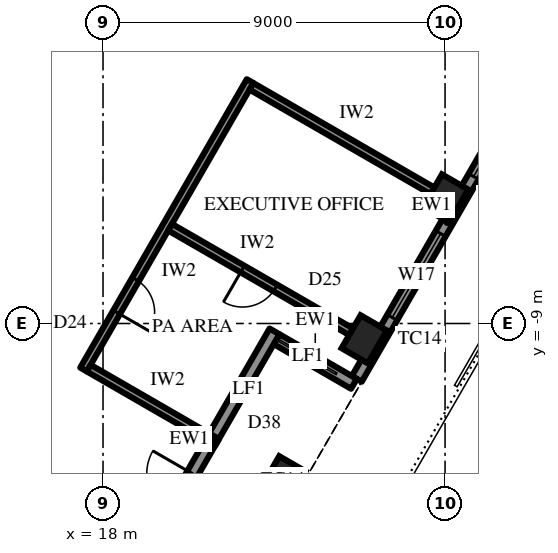
"""IFC4 building model, lengths in metres.
Left out: names, types, materials, properties, quantities, classifications, styles, units other than length and angle.
Written with IfcOpenShell. Run it as: python <this file> out.ifc"""

import sys

from ifc_helpers import new_model, si_unit, direction, frame, frame_2d, origin, origin_2d, place, context, subcontext, project, spatial, rectangle, extrude, element, fill, save


model = new_model("IFC4")
c1 = context("Model", 3, precision=1e-05, world=origin(), true_north=direction((0.0, 1.0)))
c2 = subcontext(c1, "Body", "Model", "MODEL_VIEW")
j1 = project(units=[si_unit("LENGTHUNIT", "METRE"), si_unit("PLANEANGLEUNIT", "RADIAN")], contexts=[c1])
p1 = place(None, origin())
s1 = spatial("IfcSite", under=j1, at=p1, CompositionType="ELEMENT")
p2 = place(p1, origin())
s2 = spatial("IfcBuilding", under=s1, at=p2, CompositionType="ELEMENT")
p3 = place(p2, frame((0.0, 0.0, 336.7)))
s3 = spatial("IfcBuildingStorey", under=s2, at=p3, CompositionType="ELEMENT", Elevation=336.7)
for number, where, z_axis, x_axis in (
    (1, (22.733, -13.125, 0.0), (0.0, 0.0, 1.0), (0.5, 0.866, 0.0)),
    (2, (24.874, -9.417, 0.0), (0.0, 0.0, 1.0), (0.5, 0.866, 0.0)),
    (3, (27.015, -5.708, 0.0), (0.0, 0.0, 1.0), (0.5, 0.866, 0.0)),
):
    element("IfcColumn", number, at=place(p3, frame(where, z_axis=z_axis, x_axis=x_axis)), inside=s3, PredefinedType="COLUMN", context=c2, shape_type="SweptSolid", body=[
        extrude(rectangle(XDim=1.0, YDim=0.8, at=origin_2d()), origin(), (0.0, 0.0, 1.0), 4.2),
    ])
p4 = place(p3, frame((24.677, -10.458, 0.0), z_axis=(0.0, 0.0, 1.0), x_axis=(0.499996453679, 0.866027451244, 0.0)))
e4 = element("IfcWall", 4, at=p4, inside=s3, PredefinedType="SOLIDWALL", context=c2, shape_type="SweptSolid", body=[
    extrude(rectangle(XDim=9.564, YDim=0.3, at=frame_2d((4.782, 0.0))), origin(), (0.0, 0.0, 1.0), 2.9),
])
p5 = place(p4, frame((1.866, 0.0, 0.6)))
e5 = element("IfcOpeningElement", 5, at=p5, cuts=e4, PredefinedType="OPENING", context=c2, shape_type="SweptSolid", body=[
    extrude(rectangle(XDim=2.55, YDim=2.05, at=frame_2d((1.275, 1.025))), frame((0.0, 0.16, 0.0), z_axis=(0.0, -1.0, 0.0), x_axis=(1.0, 0.0, 0.0)), (0.0, 0.0, 1.0), 0.32),
])
p6 = place(p4, frame((6.148, 0.0, 0.6)))
e6 = element("IfcOpeningElement", 6, at=p6, cuts=e4, PredefinedType="OPENING", context=c2, shape_type="SweptSolid", body=[
    extrude(rectangle(XDim=2.55, YDim=2.05, at=frame_2d((1.275, 1.025))), frame((0.0, 0.16, 0.0), z_axis=(0.0, -1.0, 0.0), x_axis=(1.0, 0.0, 0.0)), (0.0, 0.0, 1.0), 0.32),
])
p7 = place(p3, frame((24.602, -10.588, 0.0), z_axis=(0.0, 0.0, 1.0), x_axis=(-0.866016039709, 0.500016218704, 0.0)))
e7 = element("IfcWall", 7, at=p7, inside=s3, PredefinedType="SOLIDWALL", context=c2, shape_type="SweptSolid", body=[
    extrude(rectangle(XDim=2.35, YDim=0.3, at=frame_2d((1.175, 0.0))), origin(), (0.0, 0.0, 1.0), 2.9),
])
p8 = place(p3, frame((19.23, -14.892, 0.0), z_axis=(0.0, 0.0, 1.0), x_axis=(0.499999339774, 0.866025784966, 0.0)))
e8 = element("IfcWall", 8, at=p8, inside=s3, PredefinedType="SOLIDWALL", context=c2, shape_type="SweptSolid", body=[
    extrude(rectangle(XDim=6.564, YDim=0.3, at=frame_2d((3.282, 0.0))), origin(), (0.0, 0.0, 1.0), 2.9),
])
p9 = place(p8, frame((1.041, 0.0, 0.0)))
e9 = element("IfcOpeningElement", 9, at=p9, cuts=e8, PredefinedType="OPENING", context=c2, shape_type="SweptSolid", body=[
    extrude(rectangle(XDim=1.2, YDim=2.4, at=frame_2d((0.6, 1.2))), frame((0.0, 0.16, 0.0), z_axis=(0.0, -1.0, 0.0), x_axis=(1.0, 0.0, 0.0)), (0.0, 0.0, 1.0), 0.32),
])
p10 = place(p3, frame((17.487, -10.212, 0.0), z_axis=(0.0, 0.0, 1.0), x_axis=(0.500006995557, 0.86602136486, 0.0)))
e10 = element("IfcWall", 10, at=p10, inside=s3, PredefinedType="PARTITIONING", context=c2, shape_type="SweptSolid", body=[
    extrude(rectangle(XDim=8.764, YDim=0.2, at=frame_2d((4.382, 0.0))), origin(), (0.0, 0.0, 1.0), 4.0),
])
p11 = place(p10, frame((1.741, 0.0, 0.0)))
e11 = element("IfcOpeningElement", 11, at=p11, cuts=e10, PredefinedType="OPENING", context=c2, shape_type="SweptSolid", body=[
    extrude(rectangle(XDim=1.0, YDim=2.2, at=frame_2d((0.5, 1.1))), frame((0.0, 0.11, 0.0), z_axis=(0.0, -1.0, 0.0), x_axis=(1.0, 0.0, 0.0)), (0.0, 0.0, 1.0), 0.22),
])
p12 = place(p3, frame((17.624, -10.175, 0.0), z_axis=(0.0, 0.0, 1.0), x_axis=(0.86603551244, -0.499982490886, 0.0)))
e12 = element("IfcWall", 12, at=p12, inside=s3, PredefinedType="PARTITIONING", context=c2, shape_type="SweptSolid", body=[
    extrude(rectangle(XDim=3.901, YDim=0.2, at=frame_2d((1.951, 0.0))), origin(), (0.0, 0.0, 1.0), 3.082),
])
p13 = place(p3, frame((19.765, -6.467, 0.0), z_axis=(0.0, 0.0, 1.0), x_axis=(0.866027397988, -0.499996545922, 0.0)))
e13 = element("IfcWall", 13, at=p13, inside=s3, PredefinedType="PARTITIONING", context=c2, shape_type="SweptSolid", body=[
    extrude(rectangle(XDim=5.5, YDim=0.2, at=frame_2d((2.75, 0.0))), origin(), (0.0, 0.0, 1.0), 2.992),
])
p14 = place(p13, frame((2.2, 0.0, 0.0)))
e14 = element("IfcOpeningElement", 14, at=p14, cuts=e13, PredefinedType="OPENING", context=c2, shape_type="SweptSolid", body=[
    extrude(rectangle(XDim=1.0, YDim=2.2, at=frame_2d((0.5, 1.1))), frame((0.0, 0.11, 0.0), z_axis=(0.0, -1.0, 0.0), x_axis=(1.0, 0.0, 0.0)), (0.0, 0.0, 1.0), 0.22),
])
p15 = place(p3, frame((21.906, -2.758, 0.0), z_axis=(0.0, 0.0, 1.0), x_axis=(0.866027397988, -0.499996545922, 0.0)))
e15 = element("IfcWall", 15, at=p15, inside=s3, PredefinedType="PARTITIONING", context=c2, shape_type="SweptSolid", body=[
    extrude(rectangle(XDim=5.5, YDim=0.2, at=frame_2d((2.75, 0.0))), origin(), (0.0, 0.0, 1.0), 3.082),
])
p16 = place(p5, origin())
e16 = element("IfcWindow", 16, at=p16, inside=s3, PartitioningType="SINGLE_PANEL", PredefinedType="WINDOW", context=c2, shape_type="SweptSolid", body=[
    extrude(rectangle(XDim=2.55, YDim=2.05, at=frame_2d((1.275, 1.025))), frame((0.0, 0.03, 0.0), z_axis=(0.0, -1.0, 0.0), x_axis=(1.0, 0.0, 0.0)), (0.0, 0.0, 1.0), 0.06),
])
fill(e5, e16)
p17 = place(p6, origin())
e17 = element("IfcWindow", 17, at=p17, inside=s3, PartitioningType="SINGLE_PANEL", PredefinedType="WINDOW", context=c2, shape_type="SweptSolid", body=[
    extrude(rectangle(XDim=2.55, YDim=2.05, at=frame_2d((1.275, 1.025))), frame((0.0, 0.03, 0.0), z_axis=(0.0, -1.0, 0.0), x_axis=(1.0, 0.0, 0.0)), (0.0, 0.0, 1.0), 0.06),
])
fill(e6, e17)
p18 = place(p11, frame((1.0, 0.0, 0.0), z_axis=(0.0, 0.0, 1.0), x_axis=(-1.0, 0.0, 0.0)))
e18 = element("IfcDoor", 18, at=p18, inside=s3, OperationType="SINGLE_SWING_LEFT", PredefinedType="DOOR", context=c2, shape_type="SweptSolid", body=[
    extrude(rectangle(XDim=1.0, YDim=2.2, at=frame_2d((0.5, 1.1))), frame((0.0, 0.025, 0.0), z_axis=(0.0, -1.0, 0.0), x_axis=(1.0, 0.0, 0.0)), (0.0, 0.0, 1.0), 0.05),
])
fill(e11, e18)
p19 = place(p14, frame((1.0, 0.0, 0.0), z_axis=(0.0, 0.0, 1.0), x_axis=(-1.0, 0.0, 0.0)))
e19 = element("IfcDoor", 19, at=p19, inside=s3, OperationType="SINGLE_SWING_LEFT", PredefinedType="DOOR", context=c2, shape_type="SweptSolid", body=[
    extrude(rectangle(XDim=1.0, YDim=2.2, at=frame_2d((0.5, 1.1))), frame((0.0, 0.025, 0.0), z_axis=(0.0, -1.0, 0.0), x_axis=(1.0, 0.0, 0.0)), (0.0, 0.0, 1.0), 0.05),
])
fill(e14, e19)
save(model, sys.argv[1])
